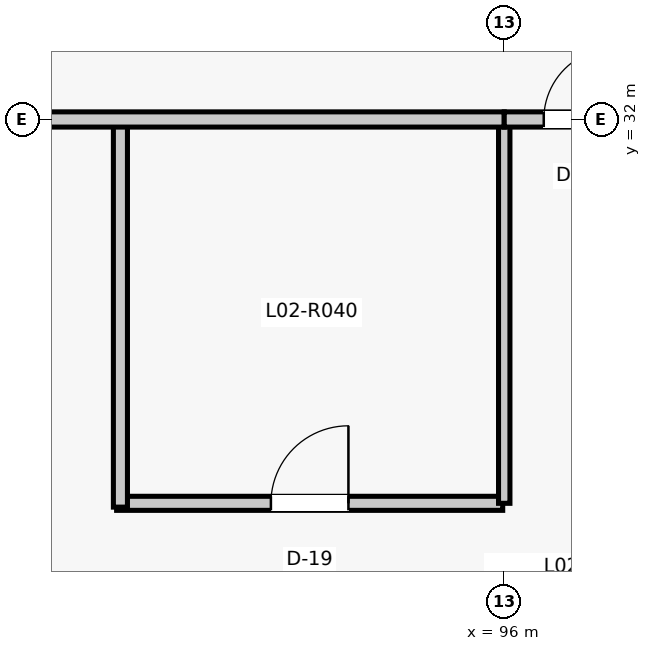
"""IFC4 building model, lengths in metres.
Left out: names, types, materials, properties, quantities, classifications, styles, units other than length and angle.
Written with IfcOpenShell. Run it as: python <this file> out.ifc"""

import sys

from ifc_helpers import new_model, si_unit, direction, frame, frame_2d, origin, place, context, subcontext, project, spatial, rectangle, extrude, element, fill, save


model = new_model("IFC4")
c1 = context("Model", 3, precision=1e-05, world=origin(), true_north=direction((0.0, 1.0)))
c2 = subcontext(c1, "Body", "Model", "MODEL_VIEW")
j1 = project(units=[si_unit("LENGTHUNIT", "METRE"), si_unit("PLANEANGLEUNIT", "RADIAN")], contexts=[c1])
p1 = place(None, origin())
s1 = spatial("IfcSite", under=j1, at=p1, CompositionType="ELEMENT")
p2 = place(p1, origin())
s2 = spatial("IfcBuilding", under=s1, at=p2, CompositionType="ELEMENT")
p3 = place(p2, frame((0.0, 0.0, 9.9)))
s3 = spatial("IfcBuildingStorey", under=s2, at=p3, CompositionType="ELEMENT", Elevation=9.9)
p4 = place(p3, frame((90.9, 26.95, 0.0), z_axis=(0.0, 0.0, 1.0), x_axis=(1.0, 0.0, 0.0)))
e1 = element("IfcWall", 1, at=p4, inside=s3, PredefinedType="PARTITIONING", context=c2, shape_type="SweptSolid", body=[
    extrude(rectangle(XDim=5.08, YDim=0.185, at=frame_2d((2.54, 0.0))), origin(), (0.0, 0.0, 1.0), 3.695),
])
p5 = place(p4, frame((2.03, 0.0, 0.0)))
e2 = element("IfcOpeningElement", 2, at=p5, cuts=e1, PredefinedType="OPENING", context=c2, shape_type="SweptSolid", body=[
    extrude(rectangle(XDim=1.02, YDim=2.2, at=frame_2d((0.51, 1.1))), frame((0.0, 0.103, 0.0), z_axis=(0.0, -1.0, 0.0), x_axis=(1.0, 0.0, 0.0)), (0.0, 0.0, 1.0), 0.205),
])
p6 = place(p3, frame((90.95, 26.9, 0.0), z_axis=(0.0, 0.0, 1.0), x_axis=(0.0, 1.0, 0.0)))
e3 = element("IfcWall", 3, at=p6, inside=s3, PredefinedType="PARTITIONING", context=c2, shape_type="SweptSolid", body=[
    extrude(rectangle(XDim=5.08, YDim=0.185, at=frame_2d((2.54, 0.0))), origin(), (0.0, 0.0, 1.0), 3.695),
])
p7 = place(p3, frame((96.0, 26.95, 0.0), z_axis=(0.0, 0.0, 1.0), x_axis=(0.0, 1.0, 0.0)))
e4 = element("IfcWall", 4, at=p7, inside=s3, PredefinedType="PARTITIONING", context=c2, shape_type="SweptSolid", body=[
    extrude(rectangle(XDim=5.03, YDim=0.15, at=frame_2d((2.515, 0.0))), origin(), (0.0, 0.0, 1.0), 3.695),
])
p8 = place(p3, frame((88.0, 32.0, 0.0), z_axis=(0.0, 0.0, 1.0), x_axis=(1.0, 0.0, 0.0)))
e5 = element("IfcWall", 5, at=p8, inside=s3, PredefinedType="PARTITIONING", context=c2, shape_type="SweptSolid", body=[
    extrude(rectangle(XDim=8.0, YDim=0.2, at=frame_2d((4.0, 0.0))), origin(), (0.0, 0.0, 1.0), 3.695),
])
p9 = place(p8, frame((0.52, 0.0, 0.0)))
e6 = element("IfcOpeningElement", 6, at=p9, cuts=e5, PredefinedType="OPENING", context=c2, shape_type="SweptSolid", body=[
    extrude(rectangle(XDim=0.94, YDim=2.12, at=frame_2d((0.47, 1.06))), frame((0.0, 0.11, 0.0), z_axis=(0.0, -1.0, 0.0), x_axis=(1.0, 0.0, 0.0)), (0.0, 0.0, 1.0), 0.22),
])
p10 = place(p3, frame((96.0, 32.0, 0.0), z_axis=(0.0, 0.0, 1.0), x_axis=(1.0, 0.0, 0.0)))
e7 = element("IfcWall", 7, at=p10, inside=s3, PredefinedType="PARTITIONING", context=c2, shape_type="SweptSolid", body=[
    extrude(rectangle(XDim=7.61, YDim=0.2, at=frame_2d((3.805, 0.0))), origin(), (0.0, 0.0, 1.0), 3.695),
])
p11 = place(p10, frame((0.52, 0.0, 0.0)))
e8 = element("IfcOpeningElement", 8, at=p11, cuts=e7, PredefinedType="OPENING", context=c2, shape_type="SweptSolid", body=[
    extrude(rectangle(XDim=0.94, YDim=2.12, at=frame_2d((0.47, 1.06))), frame((0.0, 0.11, 0.0), z_axis=(0.0, -1.0, 0.0), x_axis=(1.0, 0.0, 0.0)), (0.0, 0.0, 1.0), 0.22),
])
p12 = place(p5, origin())
e9 = element("IfcDoor", 9, at=p12, inside=s3, OperationType="SINGLE_SWING_RIGHT", PredefinedType="DOOR", context=c2, shape_type="SweptSolid", body=[
    extrude(rectangle(XDim=1.02, YDim=2.2, at=frame_2d((0.51, 1.1))), frame((0.0, 0.025, 0.0), z_axis=(0.0, -1.0, 0.0), x_axis=(1.0, 0.0, 0.0)), (0.0, 0.0, 1.0), 0.05),
])
fill(e2, e9)
p13 = place(p11, origin())
e10 = element("IfcDoor", 10, at=p13, inside=s3, OperationType="SINGLE_SWING_RIGHT", PredefinedType="DOOR", context=c2, shape_type="SweptSolid", body=[
    extrude(rectangle(XDim=0.94, YDim=2.12, at=frame_2d((0.47, 1.06))), frame((0.0, 0.025, 0.0), z_axis=(0.0, -1.0, 0.0), x_axis=(1.0, 0.0, 0.0)), (0.0, 0.0, 1.0), 0.05),
])
fill(e8, e10)
save(model, sys.argv[1])
